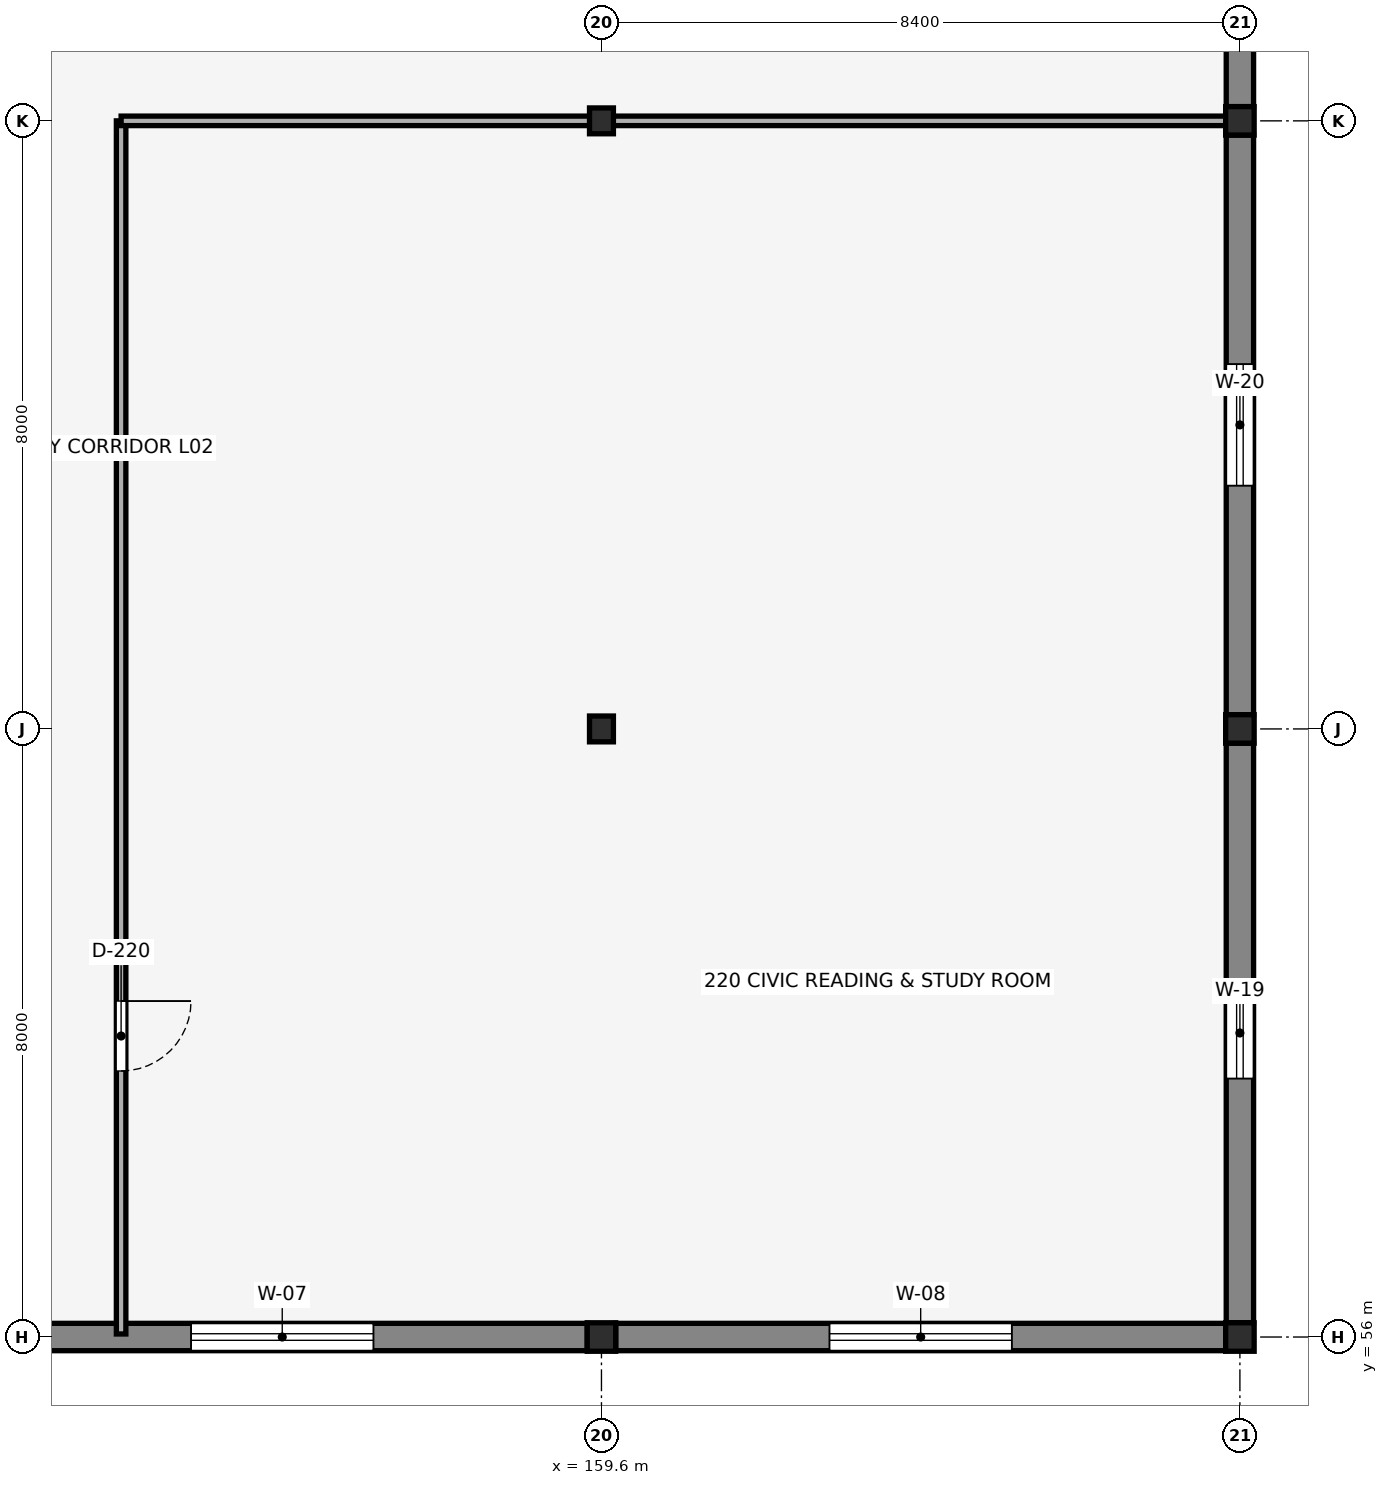
"""IFC4 building model, lengths in metres.
Left out: names, types, materials, properties, quantities, classifications, styles, units other than length and angle.
Written with IfcOpenShell. Run it as: python <this file> out.ifc"""

import sys

from ifc_helpers import new_model, si_unit, direction, frame, frame_2d, origin, origin_2d, place, context, subcontext, project, spatial, rectangle, i_section, extrude, element, fill, save


model = new_model("IFC4")
c1 = context("Model", 3, precision=1e-05, world=origin(), true_north=direction((0.0, 1.0)))
c2 = subcontext(c1, "Body", "Model", "MODEL_VIEW")
j1 = project(units=[si_unit("LENGTHUNIT", "METRE"), si_unit("PLANEANGLEUNIT", "RADIAN")], contexts=[c1])
p1 = place(None, origin())
s1 = spatial("IfcSite", under=j1, at=p1, CompositionType="ELEMENT")
p2 = place(p1, origin())
s2 = spatial("IfcBuilding", under=s1, at=p2, CompositionType="ELEMENT")
p3 = place(p2, frame((0.0, 0.0, 9.52)))
s3 = spatial("IfcBuildingStorey", under=s2, at=p3, CompositionType="ELEMENT", Elevation=9.52)
p4 = place(p3, frame((159.6, 56.0, 0.0), z_axis=(0.0, 0.0, 1.0), x_axis=(1.0, 0.0, 0.0)))
e1 = element("IfcColumn", 1, at=p4, inside=s3, PredefinedType="COLUMN", context=c2, shape_type="SweptSolid", body=[
    extrude(i_section(OverallWidth=0.375, OverallDepth=0.375, WebThickness=0.017, FlangeThickness=0.027, FilletRadius=0.015, at=origin_2d()), origin(), (0.0, 0.0, 1.0), 3.57),
])
for number, where, z_axis, x_axis in (
    (2, (159.6, 64.0, 0.0), (0.0, 0.0, 1.0), (1.0, 0.0, 0.0)),
    (3, (159.6, 72.0, 0.0), (0.0, 0.0, 1.0), (1.0, 0.0, 0.0)),
):
    element("IfcColumn", number, at=place(p3, frame(where, z_axis=z_axis, x_axis=x_axis)), inside=s3, PredefinedType="COLUMN", context=c2, shape_type="SweptSolid", body=[
        extrude(i_section(OverallWidth=0.314, OverallDepth=0.34, WebThickness=0.019, FlangeThickness=0.031, FilletRadius=0.015, at=origin_2d()), origin(), (0.0, 0.0, 1.0), 3.57),
    ])
for number, where, z_axis, x_axis in (
    (4, (168.0, 56.0, 0.0), (0.0, 0.0, 1.0), (1.0, 0.0, 0.0)),
    (5, (168.0, 64.0, 0.0), (0.0, 0.0, 1.0), (1.0, 0.0, 0.0)),
    (6, (168.0, 72.0, 0.0), (0.0, 0.0, 1.0), (1.0, 0.0, 0.0)),
):
    element("IfcColumn", number, at=place(p3, frame(where, z_axis=z_axis, x_axis=x_axis)), inside=s3, PredefinedType="COLUMN", context=c2, shape_type="SweptSolid", body=[
        extrude(i_section(OverallWidth=0.375, OverallDepth=0.375, WebThickness=0.017, FlangeThickness=0.027, FilletRadius=0.015, at=origin_2d()), origin(), (0.0, 0.0, 1.0), 3.57),
    ])
p5 = place(p3, frame((151.387, 56.0, 0.0), z_axis=(0.0, 0.0, 1.0), x_axis=(1.0, 0.0, 0.0)))
e7 = element("IfcWall", 7, at=p5, inside=s3, PredefinedType="SOLIDWALL", context=c2, shape_type="SweptSolid", body=[
    extrude(rectangle(XDim=8.025, YDim=0.36, at=frame_2d((4.013, 0.0))), origin(), (0.0, 0.0, 1.0), 3.27),
])
p6 = place(p5, frame((2.813, 0.0, 0.9), z_axis=(0.0, 0.0, 1.0), x_axis=(1.0, 0.0, 0.0)))
e8 = element("IfcOpeningElement", 8, at=p6, cuts=e7, PredefinedType="OPENING", context=c2, shape_type="SweptSolid", body=[
    extrude(rectangle(XDim=2.4, YDim=1.75, at=frame_2d((1.2, 0.875))), frame((0.0, 0.19, 0.0), z_axis=(0.0, -1.0, 0.0), x_axis=(1.0, 0.0, 0.0)), (0.0, 0.0, 1.0), 0.38),
])
p7 = place(p3, frame((159.787, 56.0, 0.0), z_axis=(0.0, 0.0, 1.0), x_axis=(1.0, 0.0, 0.0)))
e9 = element("IfcWall", 9, at=p7, inside=s3, PredefinedType="SOLIDWALL", context=c2, shape_type="SweptSolid", body=[
    extrude(rectangle(XDim=8.025, YDim=0.36, at=frame_2d((4.013, 0.0))), origin(), (0.0, 0.0, 1.0), 3.27),
])
p8 = place(p7, frame((2.813, 0.0, 0.9), z_axis=(0.0, 0.0, 1.0), x_axis=(1.0, 0.0, 0.0)))
e10 = element("IfcOpeningElement", 10, at=p8, cuts=e9, PredefinedType="OPENING", context=c2, shape_type="SweptSolid", body=[
    extrude(rectangle(XDim=2.4, YDim=1.5, at=frame_2d((1.2, 0.75))), frame((0.0, 0.19, 0.0), z_axis=(0.0, -1.0, 0.0), x_axis=(1.0, 0.0, 0.0)), (0.0, 0.0, 1.0), 0.38),
])
p9 = place(p3, frame((168.0, 56.187, 0.0), z_axis=(0.0, 0.0, 1.0), x_axis=(0.0, 1.0, 0.0)))
e11 = element("IfcWall", 11, at=p9, inside=s3, PredefinedType="SOLIDWALL", context=c2, shape_type="SweptSolid", body=[
    extrude(rectangle(XDim=7.625, YDim=0.36, at=frame_2d((3.813, 0.0))), origin(), (0.0, 0.0, 1.0), 3.219),
])
p10 = place(p9, frame((3.213, 0.0, 1.55), z_axis=(0.0, 0.0, 1.0), x_axis=(1.0, 0.0, 0.0)))
e12 = element("IfcOpeningElement", 12, at=p10, cuts=e11, PredefinedType="OPENING", context=c2, shape_type="SweptSolid", body=[
    extrude(rectangle(XDim=1.2, YDim=0.95, at=frame_2d((0.6, 0.475))), frame((0.0, 0.19, 0.0), z_axis=(0.0, -1.0, 0.0), x_axis=(1.0, 0.0, 0.0)), (0.0, 0.0, 1.0), 0.38),
])
p11 = place(p3, frame((168.0, 64.187, 0.0), z_axis=(0.0, 0.0, 1.0), x_axis=(0.0, 1.0, 0.0)))
e13 = element("IfcWall", 13, at=p11, inside=s3, PredefinedType="SOLIDWALL", context=c2, shape_type="SweptSolid", body=[
    extrude(rectangle(XDim=7.625, YDim=0.36, at=frame_2d((3.813, 0.0))), origin(), (0.0, 0.0, 1.0), 3.219),
])
p12 = place(p11, frame((3.013, 0.0, 0.9), z_axis=(0.0, 0.0, 1.0), x_axis=(1.0, 0.0, 0.0)))
e14 = element("IfcOpeningElement", 14, at=p12, cuts=e13, PredefinedType="OPENING", context=c2, shape_type="SweptSolid", body=[
    extrude(rectangle(XDim=1.6, YDim=1.2, at=frame_2d((0.8, 0.6))), frame((0.0, 0.19, 0.0), z_axis=(0.0, -1.0, 0.0), x_axis=(1.0, 0.0, 0.0)), (0.0, 0.0, 1.0), 0.38),
])
p13 = place(p3, frame((168.0, 72.187, 0.0), z_axis=(0.0, 0.0, 1.0), x_axis=(0.0, 1.0, 0.0)))
e15 = element("IfcWall", 15, at=p13, inside=s3, PredefinedType="SOLIDWALL", context=c2, shape_type="SweptSolid", body=[
    extrude(rectangle(XDim=7.625, YDim=0.36, at=frame_2d((3.813, 0.0))), origin(), (0.0, 0.0, 1.0), 3.27),
])
p14 = place(p3, frame((153.28, 56.04, 0.0), z_axis=(0.0, 0.0, 1.0), x_axis=(0.0, 1.0, 0.0)))
e16 = element("IfcWall", 16, at=p14, inside=s3, PredefinedType="PARTITIONING", context=c2, shape_type="SweptSolid", body=[
    extrude(rectangle(XDim=15.96, YDim=0.125, at=frame_2d((7.98, 0.0))), origin(), (0.0, 0.0, 1.0), 3.57),
])
p15 = place(p14, frame((4.38, 0.0, 0.0), z_axis=(0.0, 0.0, 1.0), x_axis=(-1.0, 0.0, 0.0)))
e17 = element("IfcOpeningElement", 17, at=p15, cuts=e16, PredefinedType="OPENING", context=c2, shape_type="SweptSolid", body=[
    extrude(rectangle(XDim=0.92, YDim=2.12, at=frame_2d((0.46, 1.06))), frame((0.0, 0.073, 0.0), z_axis=(0.0, -1.0, 0.0), x_axis=(1.0, 0.0, 0.0)), (0.0, 0.0, 1.0), 0.145),
])
p16 = place(p3, frame((153.28, 72.0, 0.0), z_axis=(0.0, 0.0, 1.0), x_axis=(1.0, 0.0, 0.0)))
e18 = element("IfcWall", 18, at=p16, inside=s3, PredefinedType="PARTITIONING", context=c2, shape_type="SweptSolid", body=[
    extrude(rectangle(XDim=6.173, YDim=0.125, at=frame_2d((3.086, 0.0))), origin(), (0.0, 0.0, 1.0), 3.037),
])
p17 = place(p3, frame((159.747, 72.0, 0.0), z_axis=(0.0, 0.0, 1.0), x_axis=(1.0, 0.0, 0.0)))
e19 = element("IfcWall", 19, at=p17, inside=s3, PredefinedType="PARTITIONING", context=c2, shape_type="SweptSolid", body=[
    extrude(rectangle(XDim=8.075, YDim=0.125, at=frame_2d((4.038, 0.0))), origin(), (0.0, 0.0, 1.0), 3.037),
])
p18 = place(p6, origin())
e20 = element("IfcWindow", 20, at=p18, inside=s3, PartitioningType="DOUBLE_PANEL_VERTICAL", PredefinedType="WINDOW", context=c2, shape_type="SweptSolid", body=[
    extrude(rectangle(XDim=2.4, YDim=1.75, at=frame_2d((1.2, 0.875))), frame((0.0, 0.03, 0.0), z_axis=(0.0, -1.0, 0.0), x_axis=(1.0, 0.0, 0.0)), (0.0, 0.0, 1.0), 0.06),
])
fill(e8, e20)
p19 = place(p8, origin())
e21 = element("IfcWindow", 21, at=p19, inside=s3, PartitioningType="DOUBLE_PANEL_VERTICAL", PredefinedType="WINDOW", context=c2, shape_type="SweptSolid", body=[
    extrude(rectangle(XDim=2.4, YDim=1.5, at=frame_2d((1.2, 0.75))), frame((0.0, 0.03, 0.0), z_axis=(0.0, -1.0, 0.0), x_axis=(1.0, 0.0, 0.0)), (0.0, 0.0, 1.0), 0.06),
])
fill(e10, e21)
p20 = place(p10, origin())
e22 = element("IfcWindow", 22, at=p20, inside=s3, PartitioningType="SINGLE_PANEL", PredefinedType="WINDOW", context=c2, shape_type="SweptSolid", body=[
    extrude(rectangle(XDim=1.2, YDim=0.95, at=frame_2d((0.6, 0.475))), frame((0.0, 0.03, 0.0), z_axis=(0.0, -1.0, 0.0), x_axis=(1.0, 0.0, 0.0)), (0.0, 0.0, 1.0), 0.06),
])
fill(e12, e22)
p21 = place(p12, origin())
e23 = element("IfcWindow", 23, at=p21, inside=s3, PartitioningType="DOUBLE_PANEL_VERTICAL", PredefinedType="WINDOW", context=c2, shape_type="SweptSolid", body=[
    extrude(rectangle(XDim=1.6, YDim=1.2, at=frame_2d((0.8, 0.6))), frame((0.0, 0.03, 0.0), z_axis=(0.0, -1.0, 0.0), x_axis=(1.0, 0.0, 0.0)), (0.0, 0.0, 1.0), 0.06),
])
fill(e14, e23)
p22 = place(p15, origin())
e24 = element("IfcDoor", 24, at=p22, inside=s3, OperationType="SINGLE_SWING_LEFT", PredefinedType="DOOR", context=c2, shape_type="SweptSolid", body=[
    extrude(rectangle(XDim=0.92, YDim=2.12, at=frame_2d((0.46, 1.06))), frame((0.0, 0.025, 0.0), z_axis=(0.0, -1.0, 0.0), x_axis=(1.0, 0.0, 0.0)), (0.0, 0.0, 1.0), 0.05),
])
fill(e17, e24)
save(model, sys.argv[1])
